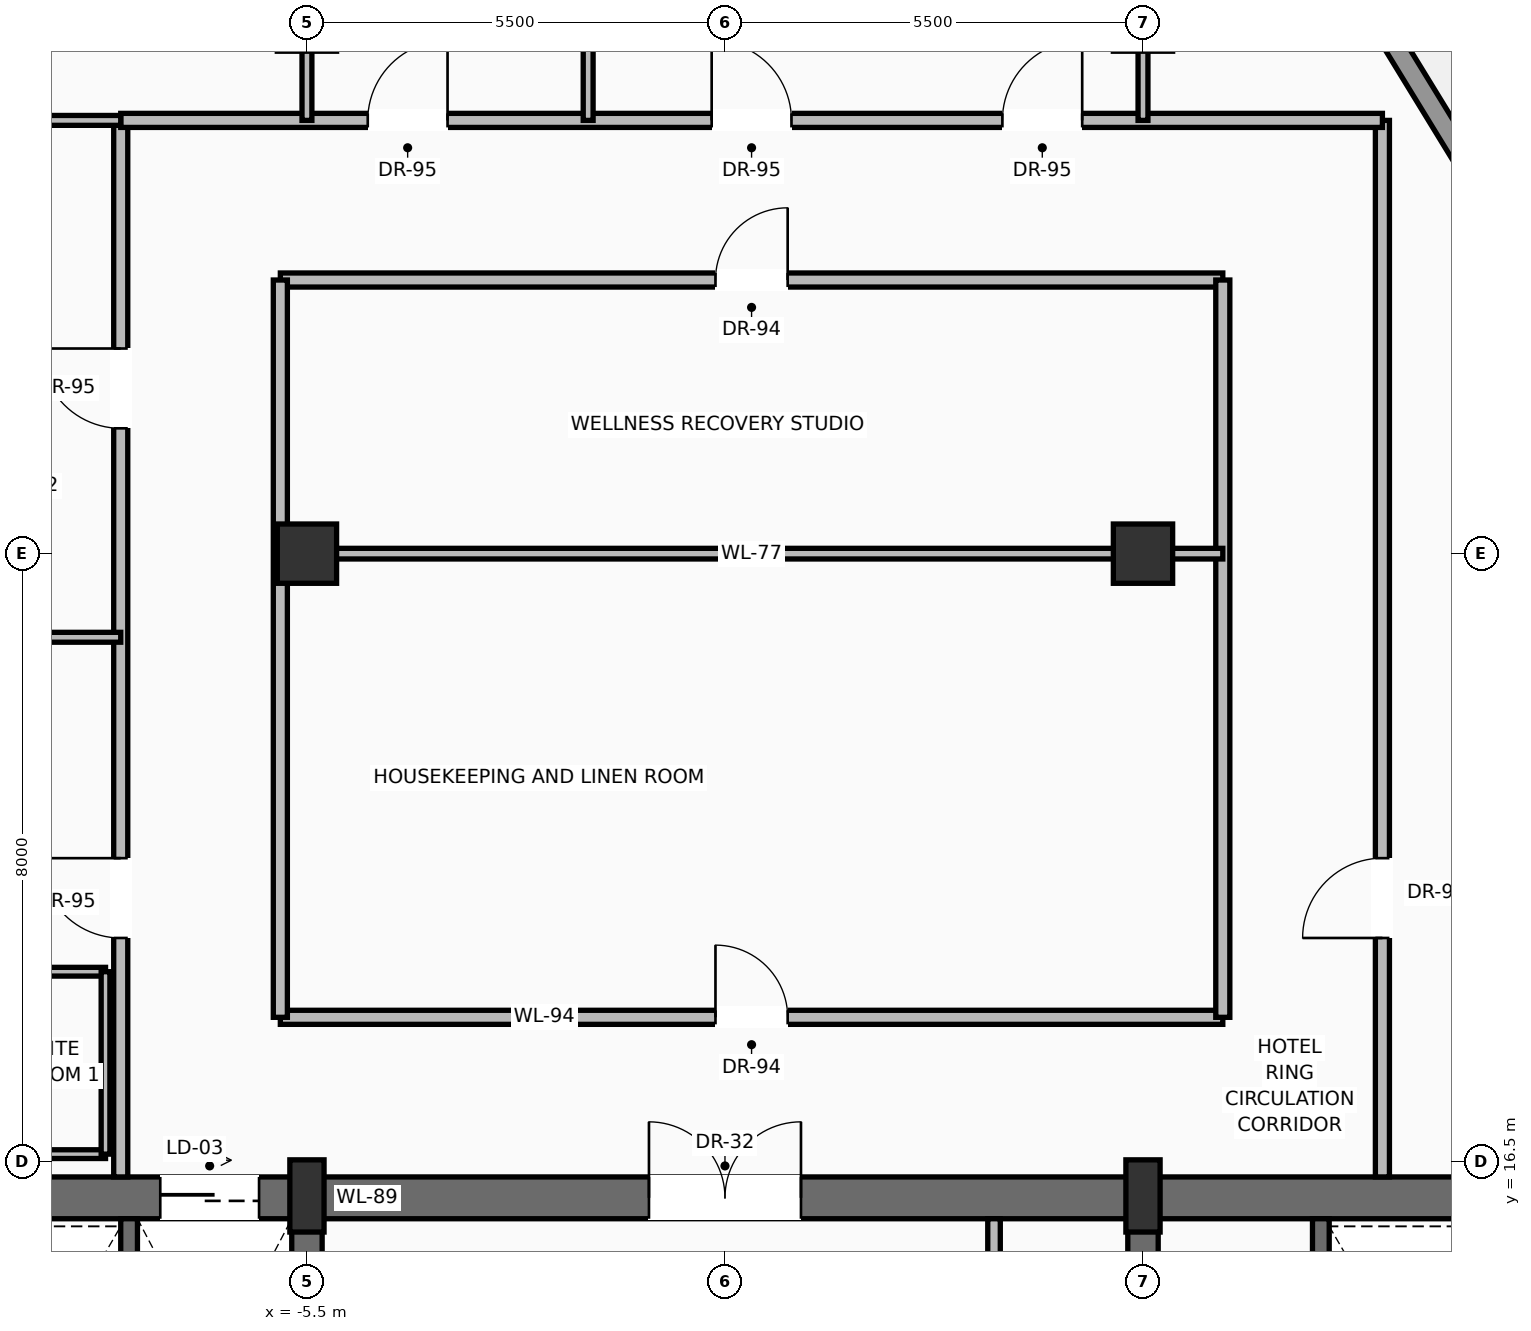
"""IFC4 building model, lengths in metres.
Left out: names, types, materials, properties, quantities, classifications, styles, units other than length and angle.
Written with IfcOpenShell. Run it as: python <this file> out.ifc"""

import sys

from ifc_helpers import new_model, si_unit, direction, frame, frame_2d, origin, origin_2d, place, context, subcontext, project, spatial, rectangle, extrude, source, transform, mapped, element, fill, save


model = new_model("IFC4")
c1 = context("Model", 3, precision=1e-05, world=origin(), true_north=direction((0.0, 1.0)))
c2 = subcontext(c1, "Body", "Model", "MODEL_VIEW")
j1 = project(units=[si_unit("LENGTHUNIT", "METRE"), si_unit("PLANEANGLEUNIT", "RADIAN")], contexts=[c1])
p1 = place(None, origin())
s1 = spatial("IfcSite", under=j1, at=p1, CompositionType="ELEMENT")
p2 = place(p1, origin())
s2 = spatial("IfcBuilding", under=s1, at=p2, CompositionType="ELEMENT")
p3 = place(p2, frame((0.0, 0.0, 247.6)))
s3 = spatial("IfcBuildingStorey", under=s2, at=p3, CompositionType="ELEMENT", Elevation=247.6)
p4 = place(p3, frame((-10.7, 16.025, 0.0), z_axis=(0.0, 0.0, 1.0), x_axis=(1.0, 0.0, 0.0)))
e1 = element("IfcWall", 1, at=p4, inside=s3, PredefinedType="SHEAR", context=c2, shape_type="SweptSolid", body=[
    extrude(rectangle(XDim=21.4, YDim=0.55, at=frame_2d((10.7, 0.0))), origin(), (0.0, 0.0, 1.0), 3.24),
])
p5 = place(p4, frame((3.27, 0.0, 0.0)))
e2 = element("IfcOpeningElement", 2, at=p5, cuts=e1, PredefinedType="OPENING", context=c2, shape_type="SweptSolid", body=[
    extrude(rectangle(XDim=1.3, YDim=2.3, at=frame_2d((0.65, 1.15))), frame((0.0, 0.285, 0.0), z_axis=(0.0, -1.0, 0.0), x_axis=(1.0, 0.0, 0.0)), (0.0, 0.0, 1.0), 0.57),
])
p6 = place(p4, frame((9.7, 0.0, 0.0)))
e3 = element("IfcOpeningElement", 3, at=p6, cuts=e1, PredefinedType="OPENING", context=c2, shape_type="SweptSolid", body=[
    extrude(rectangle(XDim=2.0, YDim=2.4, at=frame_2d((1.0, 1.2))), frame((0.0, 0.285, 0.0), z_axis=(0.0, -1.0, 0.0), x_axis=(1.0, 0.0, 0.0)), (0.0, 0.0, 1.0), 0.57),
])
p7 = place(p3, frame((-5.5, 0.575, 0.0), z_axis=(0.0, 0.0, 1.0), x_axis=(0.0, 1.0, 0.0)))
e4 = element("IfcWall", 4, at=p7, inside=s3, PredefinedType="SHEAR", context=c2, shape_type="SweptSolid", body=[
    extrude(rectangle(XDim=15.45, YDim=0.4, at=frame_2d((7.725, 0.0))), origin(), (0.0, 0.0, 1.0), 3.24),
])
p8 = place(p7, frame((8.925, 0.0, 0.0)))
e5 = element("IfcOpeningElement", 5, at=p8, cuts=e4, PredefinedType="OPENING", context=c2, shape_type="SweptSolid", body=[
    extrude(rectangle(XDim=1.1, YDim=2.2, at=frame_2d((0.55, 1.1))), frame((0.0, 0.21, 0.0), z_axis=(0.0, -1.0, 0.0), x_axis=(1.0, 0.0, 0.0)), (0.0, 0.0, 1.0), 0.42),
])
p9 = place(p3, frame((5.5, 0.575, 0.0), z_axis=(0.0, 0.0, 1.0), x_axis=(0.0, 1.0, 0.0)))
e6 = element("IfcWall", 6, at=p9, inside=s3, PredefinedType="SHEAR", context=c2, shape_type="SweptSolid", body=[
    extrude(rectangle(XDim=15.45, YDim=0.4, at=frame_2d((7.725, 0.0))), origin(), (0.0, 0.0, 1.0), 3.24),
])
p10 = place(p9, frame((8.925, 0.0, 0.0)))
e7 = element("IfcOpeningElement", 7, at=p10, cuts=e6, PredefinedType="OPENING", context=c2, shape_type="SweptSolid", body=[
    extrude(rectangle(XDim=1.1, YDim=2.2, at=frame_2d((0.55, 1.1))), frame((0.0, 0.21, 0.0), z_axis=(0.0, -1.0, 0.0), x_axis=(1.0, 0.0, 0.0)), (0.0, 0.0, 1.0), 0.42),
])
m1 = source(origin(), c2, "Body", "SweptSolid", [
    extrude(rectangle(XDim=0.45, YDim=0.95, at=origin_2d()), origin(), (0.0, 0.0, 1.0), 3.45),
])
for number, where, z_axis, x_axis in (
    (8, (-5.5, 16.05, 0.0), (0.0, 0.0, 1.0), (1.0, 0.0, 0.0)),
    (9, (5.5, 16.05, 0.0), (0.0, 0.0, 1.0), (1.0, 0.0, 0.0)),
):
    element("IfcColumn", number, at=place(p3, frame(where, z_axis=z_axis, x_axis=x_axis)), inside=s3, PredefinedType="PILASTER", context=c2, shape_type="MappedRepresentation", body=[
        mapped(m1, transform((0.0, 0.0, 0.0), scale=1.0)),
    ])
m2 = source(origin(), c2, "Body", "SweptSolid", [
    extrude(rectangle(XDim=0.78, YDim=0.78, at=origin_2d()), origin(), (0.0, 0.0, 1.0), 3.45),
])
for number, where, z_axis, x_axis in (
    (10, (-5.5, 24.5, 0.0), (0.0, 0.0, 1.0), (1.0, 0.0, 0.0)),
    (11, (5.5, 24.5, 0.0), (0.0, 0.0, 1.0), (1.0, 0.0, 0.0)),
):
    element("IfcColumn", number, at=place(p3, frame(where, z_axis=z_axis, x_axis=x_axis)), inside=s3, PredefinedType="COLUMN", context=c2, shape_type="MappedRepresentation", body=[
        mapped(m2, transform((0.0, 0.0, 0.0), scale=1.0)),
    ])
p11 = place(p3, frame((8.324, 31.99, 0.0), z_axis=(0.0, 0.0, 1.0), x_axis=(0.522311741814, -0.852754621426, 0.0)))
e12 = element("IfcWall", 12, at=p11, inside=s3, PredefinedType="SOLIDWALL", context=c2, shape_type="SweptSolid", body=[
    extrude(rectangle(XDim=19.739, YDim=0.28, at=frame_2d((9.87, 0.0))), origin(), (0.0, 0.0, 1.0), 2.82),
])
p12 = place(p11, frame((4.737, 0.0, 0.0)))
e13 = element("IfcOpeningElement", 13, at=p12, cuts=e12, PredefinedType="OPENING", context=c2, shape_type="SweptSolid", body=[
    extrude(rectangle(XDim=1.6, YDim=2.35, at=frame_2d((0.8, 1.175))), frame((0.0, 0.15, 0.0), z_axis=(0.0, -1.0, 0.0), x_axis=(1.0, 0.0, 0.0)), (0.0, 0.0, 1.0), 0.3),
])
p13 = place(p11, frame((13.423, 0.0, 0.9)))
e14 = element("IfcOpeningElement", 14, at=p13, cuts=e12, PredefinedType="OPENING", context=c2, shape_type="SweptSolid", body=[
    extrude(rectangle(XDim=2.0, YDim=1.75, at=frame_2d((1.0, 0.875))), frame((0.0, 0.15, 0.0), z_axis=(0.0, -1.0, 0.0), x_axis=(1.0, 0.0, 0.0)), (0.0, 0.0, 1.0), 0.3),
])
for number, where, z_axis, x_axis in (
    (15, (-7.84, 11.87, 0.0), (0.0, 0.0, 1.0), (0.0, 1.0, 0.0)),
    (16, (7.84, 11.87, 0.0), (0.0, 0.0, 1.0), (0.0, 1.0, 0.0)),
):
    element("IfcWall", number, at=place(p3, frame(where, z_axis=z_axis, x_axis=x_axis)), inside=s3, PredefinedType="SOLIDWALL", context=c2, shape_type="SweptSolid", body=[
        extrude(rectangle(XDim=3.88, YDim=0.22, at=frame_2d((1.94, 0.0))), origin(), (0.0, 0.0, 1.0), 3.24),
    ])
p14 = place(p3, frame((3.54, 11.22, 0.0), z_axis=(0.0, 0.0, 1.0), x_axis=(0.0, 1.0, 0.0)))
e17 = element("IfcWall", 17, at=p14, inside=s3, PredefinedType="PARTITIONING", context=c2, shape_type="SweptSolid", body=[
    extrude(rectangle(XDim=4.53, YDim=0.165, at=frame_2d((2.265, 0.0))), origin(), (0.0, 0.0, 1.0), 3.232),
])
p15 = place(p14, frame((1.25, 0.0, 0.0)))
e18 = element("IfcOpeningElement", 18, at=p15, cuts=e17, PredefinedType="OPENING", context=c2, shape_type="SweptSolid", body=[
    extrude(rectangle(XDim=0.9, YDim=2.1, at=frame_2d((0.45, 1.05))), frame((0.0, 0.093, 0.0), z_axis=(0.0, -1.0, 0.0), x_axis=(1.0, 0.0, 0.0)), (0.0, 0.0, 1.0), 0.185),
])
p16 = place(p3, frame((-5.85, 18.4, 0.0), z_axis=(0.0, 0.0, 1.0), x_axis=(1.0, 0.0, 0.0)))
e19 = element("IfcWall", 19, at=p16, inside=s3, PredefinedType="PARTITIONING", context=c2, shape_type="SweptSolid", body=[
    extrude(rectangle(XDim=12.4, YDim=0.185, at=frame_2d((6.2, 0.0))), origin(), (0.0, 0.0, 1.0), 3.232),
])
p17 = place(p16, frame((5.725, 0.0, 0.0)))
e20 = element("IfcOpeningElement", 20, at=p17, cuts=e19, PredefinedType="OPENING", context=c2, shape_type="SweptSolid", body=[
    extrude(rectangle(XDim=0.95, YDim=2.2, at=frame_2d((0.475, 1.1))), frame((0.0, 0.103, 0.0), z_axis=(0.0, -1.0, 0.0), x_axis=(1.0, 0.0, 0.0)), (0.0, 0.0, 1.0), 0.205),
])
p18 = place(p3, frame((-5.85, 28.1, 0.0), z_axis=(0.0, 0.0, 1.0), x_axis=(1.0, 0.0, 0.0)))
e21 = element("IfcWall", 21, at=p18, inside=s3, PredefinedType="PARTITIONING", context=c2, shape_type="SweptSolid", body=[
    extrude(rectangle(XDim=12.4, YDim=0.185, at=frame_2d((6.2, 0.0))), origin(), (0.0, 0.0, 1.0), 2.885),
])
p19 = place(p18, frame((5.725, 0.0, 0.0)))
e22 = element("IfcOpeningElement", 22, at=p19, cuts=e21, PredefinedType="OPENING", context=c2, shape_type="SweptSolid", body=[
    extrude(rectangle(XDim=0.95, YDim=2.2, at=frame_2d((0.475, 1.1))), frame((0.0, 0.103, 0.0), z_axis=(0.0, -1.0, 0.0), x_axis=(1.0, 0.0, 0.0)), (0.0, 0.0, 1.0), 0.205),
])
for number, where, z_axis, x_axis in (
    (23, (-5.85, 18.4, 0.0), (0.0, 0.0, 1.0), (0.0, 1.0, 0.0)),
    (24, (6.55, 18.4, 0.0), (0.0, 0.0, 1.0), (0.0, 1.0, 0.0)),
):
    element("IfcWall", number, at=place(p3, frame(where, z_axis=z_axis, x_axis=x_axis)), inside=s3, PredefinedType="PARTITIONING", context=c2, shape_type="SweptSolid", body=[
        extrude(rectangle(XDim=9.7, YDim=0.185, at=frame_2d((4.85, 0.0))), origin(), (0.0, 0.0, 1.0), 3.232),
    ])
p20 = place(p3, frame((-7.95, 16.3, 0.0), z_axis=(0.0, 0.0, 1.0), x_axis=(0.0, 1.0, 0.0)))
e25 = element("IfcWall", 25, at=p20, inside=s3, PredefinedType="PARTITIONING", context=c2, shape_type="SweptSolid", body=[
    extrude(rectangle(XDim=13.9, YDim=0.185, at=frame_2d((6.95, 0.0))), origin(), (0.0, 0.0, 1.0), 3.232),
])
p21 = place(p20, frame((3.144, 0.0, 0.0)))
e26 = element("IfcOpeningElement", 26, at=p21, cuts=e25, PredefinedType="OPENING", context=c2, shape_type="SweptSolid", body=[
    extrude(rectangle(XDim=1.05, YDim=2.25, at=frame_2d((0.525, 1.125))), frame((0.0, 0.103, 0.0), z_axis=(0.0, -1.0, 0.0), x_axis=(1.0, 0.0, 0.0)), (0.0, 0.0, 1.0), 0.205),
])
p22 = place(p20, frame((9.849, 0.0, 0.0)))
e27 = element("IfcOpeningElement", 27, at=p22, cuts=e25, PredefinedType="OPENING", context=c2, shape_type="SweptSolid", body=[
    extrude(rectangle(XDim=1.05, YDim=2.25, at=frame_2d((0.525, 1.125))), frame((0.0, 0.103, 0.0), z_axis=(0.0, -1.0, 0.0), x_axis=(1.0, 0.0, 0.0)), (0.0, 0.0, 1.0), 0.205),
])
p23 = place(p3, frame((8.65, 16.3, 0.0), z_axis=(0.0, 0.0, 1.0), x_axis=(0.0, 1.0, 0.0)))
e28 = element("IfcWall", 28, at=p23, inside=s3, PredefinedType="PARTITIONING", context=c2, shape_type="SweptSolid", body=[
    extrude(rectangle(XDim=13.9, YDim=0.185, at=frame_2d((6.95, 0.0))), origin(), (0.0, 0.0, 1.0), 3.232),
])
p24 = place(p23, frame((3.144, 0.0, 0.0)))
e29 = element("IfcOpeningElement", 29, at=p24, cuts=e28, PredefinedType="OPENING", context=c2, shape_type="SweptSolid", body=[
    extrude(rectangle(XDim=1.05, YDim=2.25, at=frame_2d((0.525, 1.125))), frame((0.0, 0.103, 0.0), z_axis=(0.0, -1.0, 0.0), x_axis=(1.0, 0.0, 0.0)), (0.0, 0.0, 1.0), 0.205),
])
p25 = place(p3, frame((-7.95, 30.2, 0.0), z_axis=(0.0, 0.0, 1.0), x_axis=(1.0, 0.0, 0.0)))
e30 = element("IfcWall", 30, at=p25, inside=s3, PredefinedType="PARTITIONING", context=c2, shape_type="SweptSolid", body=[
    extrude(rectangle(XDim=16.6, YDim=0.185, at=frame_2d((8.3, 0.0))), origin(), (0.0, 0.0, 1.0), 3.232),
])
p26 = place(p25, frame((3.25, 0.0, 0.0)))
e31 = element("IfcOpeningElement", 31, at=p26, cuts=e30, PredefinedType="OPENING", context=c2, shape_type="SweptSolid", body=[
    extrude(rectangle(XDim=1.05, YDim=2.25, at=frame_2d((0.525, 1.125))), frame((0.0, 0.103, 0.0), z_axis=(0.0, -1.0, 0.0), x_axis=(1.0, 0.0, 0.0)), (0.0, 0.0, 1.0), 0.205),
])
p27 = place(p25, frame((7.775, 0.0, 0.0)))
e32 = element("IfcOpeningElement", 32, at=p27, cuts=e30, PredefinedType="OPENING", context=c2, shape_type="SweptSolid", body=[
    extrude(rectangle(XDim=1.05, YDim=2.25, at=frame_2d((0.525, 1.125))), frame((0.0, 0.103, 0.0), z_axis=(0.0, -1.0, 0.0), x_axis=(1.0, 0.0, 0.0)), (0.0, 0.0, 1.0), 0.205),
])
p28 = place(p25, frame((11.6, 0.0, 0.0)))
e33 = element("IfcOpeningElement", 33, at=p28, cuts=e30, PredefinedType="OPENING", context=c2, shape_type="SweptSolid", body=[
    extrude(rectangle(XDim=1.05, YDim=2.25, at=frame_2d((0.525, 1.125))), frame((0.0, 0.103, 0.0), z_axis=(0.0, -1.0, 0.0), x_axis=(1.0, 0.0, 0.0)), (0.0, 0.0, 1.0), 0.205),
])
p29 = place(p3, frame((-5.85, 24.5, 0.0), z_axis=(0.0, 0.0, 1.0), x_axis=(1.0, 0.0, 0.0)))
e34 = element("IfcWall", 34, at=p29, inside=s3, PredefinedType="PARTITIONING", context=c2, shape_type="SweptSolid", body=[
    extrude(rectangle(XDim=12.4, YDim=0.14, at=frame_2d((6.2, 0.0))), origin(), (0.0, 0.0, 1.0), 2.683),
])
p30 = place(p3, frame((-10.359, 30.2, 0.0), z_axis=(0.0, 0.0, 1.0), x_axis=(1.0, 0.0, 0.0)))
e35 = element("IfcWall", 35, at=p30, inside=s3, PredefinedType="PARTITIONING", context=c2, shape_type="SweptSolid", body=[
    extrude(rectangle(XDim=2.409, YDim=0.13, at=frame_2d((1.205, 0.0))), origin(), (0.0, 0.0, 1.0), 3.232),
])
p31 = place(p3, frame((-5.5, 30.2, 0.0), z_axis=(0.0, 0.0, 1.0), x_axis=(0.0, 1.0, 0.0)))
e36 = element("IfcWall", 36, at=p31, inside=s3, PredefinedType="PARTITIONING", context=c2, shape_type="SweptSolid", body=[
    extrude(rectangle(XDim=8.286, YDim=0.13, at=frame_2d((4.143, 0.0))), origin(), (0.0, 0.0, 1.0), 2.683),
])
p32 = place(p31, frame((4.221, 0.0, 0.0)))
e37 = element("IfcOpeningElement", 37, at=p32, cuts=e36, PredefinedType="OPENING", context=c2, shape_type="SweptSolid", body=[
    extrude(rectangle(XDim=0.95, YDim=2.2, at=frame_2d((0.475, 1.1))), frame((0.0, 0.075, 0.0), z_axis=(0.0, -1.0, 0.0), x_axis=(1.0, 0.0, 0.0)), (0.0, 0.0, 1.0), 0.15),
])
p33 = place(p3, frame((5.5, 30.2, 0.0), z_axis=(0.0, 0.0, 1.0), x_axis=(0.0, 1.0, 0.0)))
e38 = element("IfcWall", 38, at=p33, inside=s3, PredefinedType="PARTITIONING", context=c2, shape_type="SweptSolid", body=[
    extrude(rectangle(XDim=6.649, YDim=0.13, at=frame_2d((3.324, 0.0))), origin(), (0.0, 0.0, 1.0), 2.683),
])
p34 = place(p3, frame((-1.8, 30.2, 0.0), z_axis=(0.0, 0.0, 1.0), x_axis=(0.0, 1.0, 0.0)))
e39 = element("IfcWall", 39, at=p34, inside=s3, PredefinedType="PARTITIONING", context=c2, shape_type="SweptSolid", body=[
    extrude(rectangle(XDim=12.564, YDim=0.13, at=frame_2d((6.282, 0.0))), origin(), (0.0, 0.0, 1.0), 3.232),
])
for number, where, z_axis, x_axis in (
    (40, (-10.8, 16.6, 0.0), (0.0, 0.0, 1.0), (1.0, 0.0, 0.0)),
    (41, (-10.8, 19.0, 0.0), (0.0, 0.0, 1.0), (1.0, 0.0, 0.0)),
):
    element("IfcWall", number, at=place(p3, frame(where, z_axis=z_axis, x_axis=x_axis)), inside=s3, PredefinedType="PARTITIONING", context=c2, shape_type="SweptSolid", body=[
        extrude(rectangle(XDim=2.65, YDim=0.115, at=frame_2d((1.325, 0.0))), origin(), (0.0, 0.0, 1.0), 3.232),
    ])
p35 = place(p3, frame((-8.15, 16.6, 0.0), z_axis=(0.0, 0.0, 1.0), x_axis=(0.0, 1.0, 0.0)))
e42 = element("IfcWall", 42, at=p35, inside=s3, PredefinedType="PARTITIONING", context=c2, shape_type="SweptSolid", body=[
    extrude(rectangle(XDim=2.4, YDim=0.115, at=frame_2d((1.2, 0.0))), origin(), (0.0, 0.0, 1.0), 3.232),
])
p36 = place(p3, frame((-14.347, 23.4, 0.0), z_axis=(0.0, 0.0, 1.0), x_axis=(1.0, 0.0, 0.0)))
e43 = element("IfcWall", 43, at=p36, inside=s3, PredefinedType="PARTITIONING", context=c2, shape_type="SweptSolid", body=[
    extrude(rectangle(XDim=6.397, YDim=0.13, at=frame_2d((3.199, 0.0))), origin(), (0.0, 0.0, 1.0), 3.232),
])
m3 = source(origin(), c2, "Body", "SweptSolid", [
    extrude(rectangle(XDim=1.3, YDim=2.3, at=frame_2d((0.65, 1.15))), frame((0.0, 0.025, 0.0), z_axis=(0.0, -1.0, 0.0), x_axis=(1.0, 0.0, 0.0)), (0.0, 0.0, 1.0), 0.05),
])
p37 = place(p5, origin())
e44 = element("IfcDoor", 44, at=p37, inside=s3, OperationType="SLIDING_TO_RIGHT", PredefinedType="DOOR", context=c2, shape_type="MappedRepresentation", body=[
    mapped(m3, transform((0.0, 0.0, 0.0), scale=1.0)),
])
fill(e2, e44)
m4 = source(origin(), c2, "Body", "SweptSolid", [
    extrude(rectangle(XDim=2.0, YDim=2.4, at=frame_2d((1.0, 1.2))), frame((0.0, 0.025, 0.0), z_axis=(0.0, -1.0, 0.0), x_axis=(1.0, 0.0, 0.0)), (0.0, 0.0, 1.0), 0.05),
])
p38 = place(p6, origin())
e45 = element("IfcDoor", 45, at=p38, inside=s3, OperationType="DOUBLE_DOOR_SINGLE_SWING", PredefinedType="DOOR", context=c2, shape_type="MappedRepresentation", body=[
    mapped(m4, transform((0.0, 0.0, 0.0), scale=1.0)),
])
fill(e3, e45)
m5 = source(origin(), c2, "Body", "SweptSolid", [
    extrude(rectangle(XDim=0.95, YDim=2.2, at=frame_2d((0.475, 1.1))), frame((0.0, 0.025, 0.0), z_axis=(0.0, -1.0, 0.0), x_axis=(1.0, 0.0, 0.0)), (0.0, 0.0, 1.0), 0.05),
])
p39 = place(p17, origin())
e46 = element("IfcDoor", 46, at=p39, inside=s3, OperationType="SINGLE_SWING_LEFT", PredefinedType="DOOR", context=c2, shape_type="MappedRepresentation", body=[
    mapped(m5, transform((0.0, 0.0, 0.0), scale=1.0)),
])
fill(e20, e46)
p40 = place(p19, origin())
e47 = element("IfcDoor", 47, at=p40, inside=s3, OperationType="SINGLE_SWING_RIGHT", PredefinedType="DOOR", context=c2, shape_type="MappedRepresentation", body=[
    mapped(m5, transform((0.0, 0.0, 0.0), scale=1.0)),
])
fill(e22, e47)
m6 = source(origin(), c2, "Body", "SweptSolid", [
    extrude(rectangle(XDim=1.05, YDim=2.25, at=frame_2d((0.525, 1.125))), frame((0.0, 0.025, 0.0), z_axis=(0.0, -1.0, 0.0), x_axis=(1.0, 0.0, 0.0)), (0.0, 0.0, 1.0), 0.05),
])
p41 = place(p21, origin())
e48 = element("IfcDoor", 48, at=p41, inside=s3, OperationType="SINGLE_SWING_RIGHT", PredefinedType="DOOR", context=c2, shape_type="MappedRepresentation", body=[
    mapped(m6, transform((0.0, 0.0, 0.0), scale=1.0)),
])
fill(e26, e48)
p42 = place(p22, origin())
e49 = element("IfcDoor", 49, at=p42, inside=s3, OperationType="SINGLE_SWING_RIGHT", PredefinedType="DOOR", context=c2, shape_type="MappedRepresentation", body=[
    mapped(m6, transform((0.0, 0.0, 0.0), scale=1.0)),
])
fill(e27, e49)
p43 = place(p24, origin())
e50 = element("IfcDoor", 50, at=p43, inside=s3, OperationType="SINGLE_SWING_LEFT", PredefinedType="DOOR", context=c2, shape_type="MappedRepresentation", body=[
    mapped(m6, transform((0.0, 0.0, 0.0), scale=1.0)),
])
fill(e29, e50)
p44 = place(p26, origin())
e51 = element("IfcDoor", 51, at=p44, inside=s3, OperationType="SINGLE_SWING_RIGHT", PredefinedType="DOOR", context=c2, shape_type="MappedRepresentation", body=[
    mapped(m6, transform((0.0, 0.0, 0.0), scale=1.0)),
])
fill(e31, e51)
p45 = place(p27, origin())
e52 = element("IfcDoor", 52, at=p45, inside=s3, OperationType="SINGLE_SWING_LEFT", PredefinedType="DOOR", context=c2, shape_type="MappedRepresentation", body=[
    mapped(m6, transform((0.0, 0.0, 0.0), scale=1.0)),
])
fill(e32, e52)
p46 = place(p28, origin())
e53 = element("IfcDoor", 53, at=p46, inside=s3, OperationType="SINGLE_SWING_RIGHT", PredefinedType="DOOR", context=c2, shape_type="MappedRepresentation", body=[
    mapped(m6, transform((0.0, 0.0, 0.0), scale=1.0)),
])
fill(e33, e53)
save(model, sys.argv[1])
